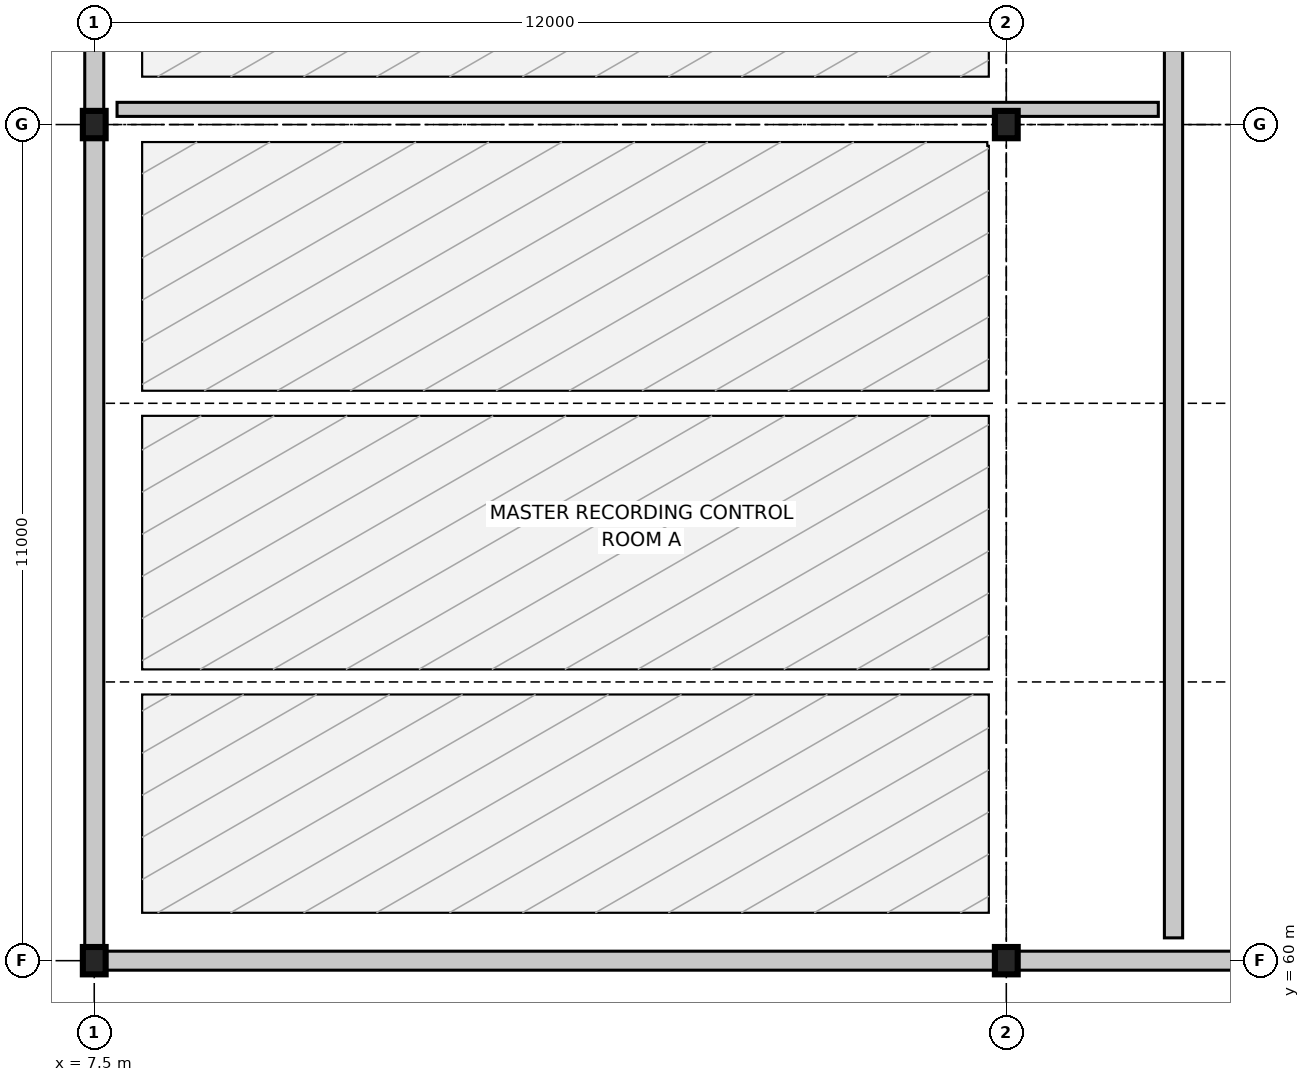
"""IFC4 building model, lengths in metres.
Left out: names, types, materials, properties, quantities, classifications, styles, units other than length and angle.
Written with IfcOpenShell. Run it as: python <this file> out.ifc"""

import sys

from ifc_helpers import new_model, si_unit, direction, frame, frame_2d, origin, origin_2d, place, context, subcontext, project, spatial, rectangle, i_section, extrude, element, fill, save


model = new_model("IFC4")
c1 = context("Model", 3, precision=1e-05, world=origin(), true_north=direction((0.0, 1.0)))
c2 = subcontext(c1, "Body", "Model", "MODEL_VIEW")
j1 = project(units=[si_unit("LENGTHUNIT", "METRE"), si_unit("PLANEANGLEUNIT", "RADIAN")], contexts=[c1])
p1 = place(None, origin())
s1 = spatial("IfcSite", under=j1, at=p1, CompositionType="ELEMENT")
p2 = place(p1, origin())
s2 = spatial("IfcBuilding", under=s1, at=p2, CompositionType="ELEMENT")
p3 = place(p2, frame((0.0, 0.0, 4.8)))
s3 = spatial("IfcBuildingStorey", under=s2, at=p3, CompositionType="ELEMENT", Elevation=4.8)
for number, where, z_axis, x_axis in (
    (1, (7.5, 60.0, 0.0), (0.0, 0.0, 1.0), (1.0, 0.0, 0.0)),
    (2, (7.5, 71.0, 0.0), (0.0, 0.0, 1.0), (1.0, 0.0, 0.0)),
    (3, (19.5, 60.0, 0.0), (0.0, 0.0, 1.0), (1.0, 0.0, 0.0)),
    (4, (19.5, 71.0, 0.0), (0.0, 0.0, 1.0), (1.0, 0.0, 0.0)),
):
    element("IfcColumn", number, at=place(p3, frame(where, z_axis=z_axis, x_axis=x_axis)), inside=s3, PredefinedType="COLUMN", context=c2, shape_type="SweptSolid", body=[
        extrude(i_section(OverallWidth=0.3, OverallDepth=0.36, WebThickness=0.012, FlangeThickness=0.022, FilletRadius=0.027, at=origin_2d()), origin(), (0.0, 0.0, 1.0), 4.8),
    ])
p4 = place(p3, frame((19.48, 60.0, 0.0), z_axis=(0.0, 0.0, 1.0), x_axis=(-1.0, 0.0, 0.0)))
e5 = element("IfcWall", 5, at=p4, inside=s3, PredefinedType="SOLIDWALL", context=c2, shape_type="SweptSolid", body=[
    extrude(rectangle(XDim=11.96, YDim=0.25, at=frame_2d((5.98, 0.0))), origin(), (0.0, 0.0, 1.0), 4.078),
])
p5 = place(p4, frame((4.98, 0.0, 0.9)))
e6 = element("IfcOpeningElement", 6, at=p5, cuts=e5, PredefinedType="OPENING", context=c2, shape_type="SweptSolid", body=[
    extrude(rectangle(XDim=2.0, YDim=1.55, at=frame_2d((1.0, 0.775))), frame((0.0, 0.135, 0.0), z_axis=(0.0, -1.0, 0.0), x_axis=(1.0, 0.0, 0.0)), (0.0, 0.0, 1.0), 0.27),
])
p6 = place(p3, frame((31.48, 60.0, 0.0), z_axis=(0.0, 0.0, 1.0), x_axis=(-1.0, 0.0, 0.0)))
e7 = element("IfcWall", 7, at=p6, inside=s3, PredefinedType="SOLIDWALL", context=c2, shape_type="SweptSolid", body=[
    extrude(rectangle(XDim=11.96, YDim=0.25, at=frame_2d((5.98, 0.0))), origin(), (0.0, 0.0, 1.0), 3.878),
])
p7 = place(p6, frame((4.88, 0.0, 0.9)))
e8 = element("IfcOpeningElement", 8, at=p7, cuts=e7, PredefinedType="OPENING", context=c2, shape_type="SweptSolid", body=[
    extrude(rectangle(XDim=2.2, YDim=1.55, at=frame_2d((1.1, 0.775))), frame((0.0, 0.135, 0.0), z_axis=(0.0, -1.0, 0.0), x_axis=(1.0, 0.0, 0.0)), (0.0, 0.0, 1.0), 0.27),
])
p8 = place(p3, frame((7.5, 71.02, 0.0), z_axis=(0.0, 0.0, 1.0), x_axis=(0.0, 1.0, 0.0)))
e9 = element("IfcWall", 9, at=p8, inside=s3, PredefinedType="SOLIDWALL", context=c2, shape_type="SweptSolid", body=[
    extrude(rectangle(XDim=10.96, YDim=0.25, at=frame_2d((5.48, 0.0))), origin(), (0.0, 0.0, 1.0), 4.078),
])
p9 = place(p8, frame((4.43, 0.0, 1.05)))
e10 = element("IfcOpeningElement", 10, at=p9, cuts=e9, PredefinedType="OPENING", context=c2, shape_type="SweptSolid", body=[
    extrude(rectangle(XDim=2.1, YDim=1.35, at=frame_2d((1.05, 0.675))), frame((0.0, 0.135, 0.0), z_axis=(0.0, -1.0, 0.0), x_axis=(1.0, 0.0, 0.0)), (0.0, 0.0, 1.0), 0.27),
])
p10 = place(p3, frame((7.5, 60.02, 0.0), z_axis=(0.0, 0.0, 1.0), x_axis=(0.0, 1.0, 0.0)))
e11 = element("IfcWall", 11, at=p10, inside=s3, PredefinedType="SOLIDWALL", context=c2, shape_type="SweptSolid", body=[
    extrude(rectangle(XDim=10.96, YDim=0.25, at=frame_2d((5.48, 0.0))), origin(), (0.0, 0.0, 1.0), 4.078),
])
p11 = place(p10, frame((4.28, 0.0, 1.05)))
e12 = element("IfcOpeningElement", 12, at=p11, cuts=e11, PredefinedType="OPENING", context=c2, shape_type="SweptSolid", body=[
    extrude(rectangle(XDim=2.4, YDim=1.35, at=frame_2d((1.2, 0.675))), frame((0.0, 0.135, 0.0), z_axis=(0.0, -1.0, 0.0), x_axis=(1.0, 0.0, 0.0)), (0.0, 0.0, 1.0), 0.27),
])
p12 = place(p3, frame((21.7, 60.3, 0.0), z_axis=(0.0, 0.0, 1.0), x_axis=(0.0, 1.0, 0.0)))
e13 = element("IfcWall", 13, at=p12, inside=s3, PredefinedType="PARTITIONING", context=c2, shape_type="SweptSolid", body=[
    extrude(rectangle(XDim=20.9, YDim=0.24, at=frame_2d((10.45, 0.0))), origin(), (0.0, 0.0, 1.0), 3.73),
])
p13 = place(p3, frame((7.8, 71.2, 0.0), z_axis=(0.0, 0.0, 1.0), x_axis=(1.0, 0.0, 0.0)))
e14 = element("IfcWall", 14, at=p13, inside=s3, PredefinedType="PARTITIONING", context=c2, shape_type="SweptSolid", body=[
    extrude(rectangle(XDim=13.7, YDim=0.185, at=frame_2d((6.85, 0.0))), origin(), (0.0, 0.0, 1.0), 3.73),
])
p14 = place(p13, frame((6.325, 0.0, 0.0)))
e15 = element("IfcOpeningElement", 15, at=p14, cuts=e14, PredefinedType="OPENING", context=c2, shape_type="SweptSolid", body=[
    extrude(rectangle(XDim=1.05, YDim=2.15, at=frame_2d((0.525, 1.075))), frame((0.0, 0.103, 0.0), z_axis=(0.0, -1.0, 0.0), x_axis=(1.0, 0.0, 0.0)), (0.0, 0.0, 1.0), 0.205),
])
p15 = place(p5, origin())
e16 = element("IfcWindow", 16, at=p15, inside=s3, PartitioningType="SINGLE_PANEL", PredefinedType="WINDOW", context=c2, shape_type="SweptSolid", body=[
    extrude(rectangle(XDim=2.0, YDim=1.55, at=frame_2d((1.0, 0.775))), frame((0.0, 0.03, 0.0), z_axis=(0.0, -1.0, 0.0), x_axis=(1.0, 0.0, 0.0)), (0.0, 0.0, 1.0), 0.06),
])
fill(e6, e16)
p16 = place(p11, origin())
e17 = element("IfcWindow", 17, at=p16, inside=s3, PartitioningType="SINGLE_PANEL", PredefinedType="WINDOW", context=c2, shape_type="SweptSolid", body=[
    extrude(rectangle(XDim=2.4, YDim=1.35, at=frame_2d((1.2, 0.675))), frame((0.0, 0.03, 0.0), z_axis=(0.0, -1.0, 0.0), x_axis=(1.0, 0.0, 0.0)), (0.0, 0.0, 1.0), 0.06),
])
fill(e12, e17)
p17 = place(p14, origin())
e18 = element("IfcDoor", 18, at=p17, inside=s3, OperationType="SINGLE_SWING_RIGHT", PredefinedType="DOOR", context=c2, shape_type="SweptSolid", body=[
    extrude(rectangle(XDim=1.05, YDim=2.15, at=frame_2d((0.525, 1.075))), frame((0.0, 0.025, 0.0), z_axis=(0.0, -1.0, 0.0), x_axis=(1.0, 0.0, 0.0)), (0.0, 0.0, 1.0), 0.05),
])
fill(e15, e18)
save(model, sys.argv[1])
